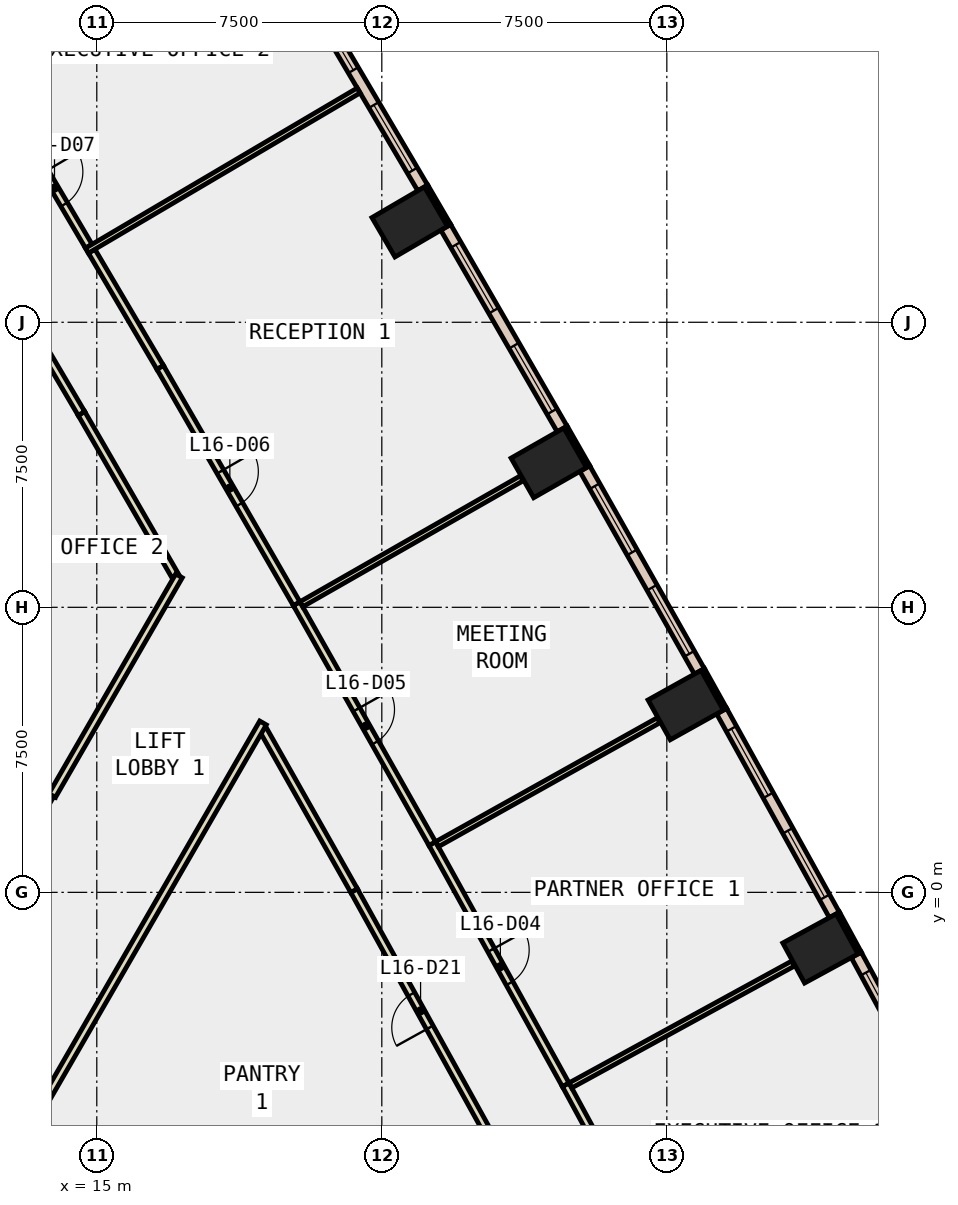
"""IFC4 building model, lengths in metres.
Left out: names, types, materials, properties, quantities, classifications, styles, units other than length and angle.
Written with IfcOpenShell. Run it as: python <this file> out.ifc"""

import sys

from ifc_helpers import new_model, si_unit, direction, frame, frame_2d, origin, origin_2d, place, context, subcontext, project, spatial, polyline, rectangle, outline, extrude, element, fill, save


model = new_model("IFC4")
c1 = context("Model", 3, precision=1e-05, world=origin(), true_north=direction((0.0, 1.0)))
c2 = subcontext(c1, "Body", "Model", "MODEL_VIEW")
j1 = project(units=[si_unit("LENGTHUNIT", "METRE"), si_unit("PLANEANGLEUNIT", "RADIAN")], contexts=[c1])
p1 = place(None, origin())
s1 = spatial("IfcSite", under=j1, at=p1, CompositionType="ELEMENT")
p2 = place(p1, origin())
s2 = spatial("IfcBuilding", under=s1, at=p2, CompositionType="ELEMENT")
p3 = place(p2, frame((0.0, 0.0, 77.0)))
s3 = spatial("IfcBuildingStorey", under=s2, at=p3, CompositionType="ELEMENT", Elevation=77.0)
for number, where, z_axis, x_axis in (
    (1, (34.041, -1.477, -0.4), (0.0, 0.0, 1.0), (-0.478, 0.878, 0.0)),
    (2, (30.497, 4.928, -0.4), (0.0, 0.0, 1.0), (-0.487, 0.873, 0.0)),
    (3, (26.894, 11.301, -0.4), (0.0, 0.0, 1.0), (-0.496, 0.869, 0.0)),
    (4, (23.234, 17.64, -0.4), (0.0, 0.0, 1.0), (-0.504, 0.864, 0.0)),
):
    element("IfcColumn", number, at=place(p3, frame(where, z_axis=z_axis, x_axis=x_axis)), inside=s3, PredefinedType="COLUMN", context=c2, shape_type="SweptSolid", body=[
        extrude(rectangle(XDim=1.2, YDim=1.6, at=origin_2d()), origin(), (0.0, 0.0, 1.0), 4.0),
    ])
p4 = place(p3, frame((0.0, 0.0, -0.4)))
e5 = element("IfcWall", 5, at=p4, inside=s3, PredefinedType="SHEAR", context=c2, shape_type="SweptSolid", body=[
    extrude(outline(polyline([(8.517, 11.748), (7.694, 11.273), (12.759, 2.5), (13.856, 2.5), (8.517, 11.748)])), origin(), (0.0, 0.0, 1.0), 4.0),
])
p5 = place(p3, frame((0.0, 0.0, -0.4)))
e6 = element("IfcWall", 6, at=p5, inside=s3, PredefinedType="SHEAR", context=c2, shape_type="SweptSolid", body=[
    extrude(outline(polyline([(11.844, 0.915), (12.667, 0.44), (13.856, 2.5), (12.759, 2.5), (11.844, 0.915)])), origin(), (0.0, 0.0, 1.0), 4.0),
])
p6 = place(p3, frame((9.31, -5.375, -0.4), z_axis=(0.0, 0.0, 1.0), x_axis=(0.866017533419, -0.500013631625, 0.0)))
e7 = element("IfcWall", 7, at=p6, inside=s3, PredefinedType="SHEAR", context=c2, shape_type="SweptSolid", body=[
    extrude(rectangle(XDim=9.0, YDim=0.8, at=frame_2d((4.5, 0.0))), origin(), (0.0, 0.0, 1.0), 4.0),
])
p7 = place(p3, frame((35.074, -1.598, 0.0), z_axis=(0.0, 0.0, 1.0), x_axis=(-0.478267644701, 0.878214131082, 0.0)))
e8 = element("IfcWall", 8, at=p7, inside=s3, PredefinedType="STANDARD", context=c2, shape_type="SweptSolid", body=[
    extrude(rectangle(XDim=1.2, YDim=0.1, at=frame_2d((0.6, 0.0))), origin(), (0.0, 0.0, 1.0), 3.6),
])
p8 = place(p3, frame((31.531, 4.818, 0.0), z_axis=(0.0, 0.0, 1.0), x_axis=(-0.486817526853, 0.873503689488, 0.0)))
e9 = element("IfcWall", 9, at=p8, inside=s3, PredefinedType="STANDARD", context=c2, shape_type="SweptSolid", body=[
    extrude(rectangle(XDim=1.2, YDim=0.1, at=frame_2d((0.6, 0.0))), origin(), (0.0, 0.0, 1.0), 3.6),
])
p9 = place(p3, frame((27.93, 11.201, 0.0), z_axis=(0.0, 0.0, 1.0), x_axis=(-0.495854054996, 0.868405870629, 0.0)))
e10 = element("IfcWall", 10, at=p9, inside=s3, PredefinedType="STANDARD", context=c2, shape_type="SweptSolid", body=[
    extrude(rectangle(XDim=1.2, YDim=0.1, at=frame_2d((0.6, 0.0))), origin(), (0.0, 0.0, 1.0), 3.6),
])
p10 = place(p3, frame((24.27, 17.551, 0.0), z_axis=(0.0, 0.0, 1.0), x_axis=(-0.504313844903, 0.863520437418, 0.0)))
e11 = element("IfcWall", 11, at=p10, inside=s3, PredefinedType="STANDARD", context=c2, shape_type="SweptSolid", body=[
    extrude(rectangle(XDim=1.2, YDim=0.1, at=frame_2d((0.6, 0.0))), origin(), (0.0, 0.0, 1.0), 3.6),
])
p11 = place(p3, frame((37.903, -7.036, 0.0), z_axis=(0.0, 0.0, 1.0), x_axis=(-0.476174096946, 0.879351027404, 0.0)))
e12 = element("IfcWall", 12, at=p11, inside=s3, PredefinedType="STANDARD", context=c2, shape_type="SweptSolid", body=[
    extrude(rectangle(XDim=6.131, YDim=0.3, at=frame_2d((3.065, 0.0))), origin(), (0.0, 0.0, 1.0), 3.6),
])
p12 = place(p11, frame((0.533, 0.0, 0.9)))
e13 = element("IfcOpeningElement", 13, at=p12, cuts=e12, PredefinedType="OPENING", context=c2, shape_type="SweptSolid", body=[
    extrude(rectangle(XDim=2.0, YDim=2.6, at=frame_2d((1.0, 1.3))), frame((0.0, 0.16, 0.0), z_axis=(0.0, -1.0, 0.0), x_axis=(1.0, 0.0, 0.0)), (0.0, 0.0, 1.0), 0.32),
])
p13 = place(p11, frame((3.598, 0.0, 0.9)))
e14 = element("IfcOpeningElement", 14, at=p13, cuts=e12, PredefinedType="OPENING", context=c2, shape_type="SweptSolid", body=[
    extrude(rectangle(XDim=2.0, YDim=2.6, at=frame_2d((1.0, 1.3))), frame((0.0, 0.16, 0.0), z_axis=(0.0, -1.0, 0.0), x_axis=(1.0, 0.0, 0.0)), (0.0, 0.0, 1.0), 0.32),
])
p14 = place(p3, frame((34.409, -0.595, 0.0), z_axis=(0.0, 0.0, 1.0), x_axis=(-0.484025698618, 0.875053782963, 0.0)))
e15 = element("IfcWall", 15, at=p14, inside=s3, PredefinedType="STANDARD", context=c2, shape_type="SweptSolid", body=[
    extrude(rectangle(XDim=6.13, YDim=0.3, at=frame_2d((3.065, 0.0))), origin(), (0.0, 0.0, 1.0), 3.6),
])
p15 = place(p14, frame((0.532, 0.0, 0.9)))
e16 = element("IfcOpeningElement", 16, at=p15, cuts=e15, PredefinedType="OPENING", context=c2, shape_type="SweptSolid", body=[
    extrude(rectangle(XDim=2.0, YDim=2.6, at=frame_2d((1.0, 1.3))), frame((0.0, 0.16, 0.0), z_axis=(0.0, -1.0, 0.0), x_axis=(1.0, 0.0, 0.0)), (0.0, 0.0, 1.0), 0.32),
])
p16 = place(p14, frame((3.597, 0.0, 0.9)))
e17 = element("IfcOpeningElement", 17, at=p16, cuts=e15, PredefinedType="OPENING", context=c2, shape_type="SweptSolid", body=[
    extrude(rectangle(XDim=2.0, YDim=2.6, at=frame_2d((1.0, 1.3))), frame((0.0, 0.16, 0.0), z_axis=(0.0, -1.0, 0.0), x_axis=(1.0, 0.0, 0.0)), (0.0, 0.0, 1.0), 0.32),
])
p17 = place(p3, frame((30.857, 5.814, 0.0), z_axis=(0.0, 0.0, 1.0), x_axis=(-0.492097935349, 0.870539845168, 0.0)))
e18 = element("IfcWall", 18, at=p17, inside=s3, PredefinedType="STANDARD", context=c2, shape_type="SweptSolid", body=[
    extrude(rectangle(XDim=6.131, YDim=0.3, at=frame_2d((3.065, 0.0))), origin(), (0.0, 0.0, 1.0), 3.6),
])
p18 = place(p17, frame((0.533, 0.0, 0.9)))
e19 = element("IfcOpeningElement", 19, at=p18, cuts=e18, PredefinedType="OPENING", context=c2, shape_type="SweptSolid", body=[
    extrude(rectangle(XDim=2.0, YDim=2.6, at=frame_2d((1.0, 1.3))), frame((0.0, 0.16, 0.0), z_axis=(0.0, -1.0, 0.0), x_axis=(1.0, 0.0, 0.0)), (0.0, 0.0, 1.0), 0.32),
])
p19 = place(p17, frame((3.598, 0.0, 0.9)))
e20 = element("IfcOpeningElement", 20, at=p19, cuts=e18, PredefinedType="OPENING", context=c2, shape_type="SweptSolid", body=[
    extrude(rectangle(XDim=2.0, YDim=2.6, at=frame_2d((1.0, 1.3))), frame((0.0, 0.16, 0.0), z_axis=(0.0, -1.0, 0.0), x_axis=(1.0, 0.0, 0.0)), (0.0, 0.0, 1.0), 0.32),
])
p20 = place(p3, frame((27.246, 12.191, 0.0), z_axis=(0.0, 0.0, 1.0), x_axis=(-0.499998239139, 0.866026420416, 0.0)))
e21 = element("IfcWall", 21, at=p20, inside=s3, PredefinedType="STANDARD", context=c2, shape_type="SweptSolid", body=[
    extrude(rectangle(XDim=6.13, YDim=0.3, at=frame_2d((3.065, 0.0))), origin(), (0.0, 0.0, 1.0), 3.6),
])
p21 = place(p20, frame((0.533, 0.0, 0.9)))
e22 = element("IfcOpeningElement", 22, at=p21, cuts=e21, PredefinedType="OPENING", context=c2, shape_type="SweptSolid", body=[
    extrude(rectangle(XDim=2.0, YDim=2.6, at=frame_2d((1.0, 1.3))), frame((0.0, 0.16, 0.0), z_axis=(0.0, -1.0, 0.0), x_axis=(1.0, 0.0, 0.0)), (0.0, 0.0, 1.0), 0.32),
])
p22 = place(p20, frame((3.598, 0.0, 0.9)))
e23 = element("IfcOpeningElement", 23, at=p22, cuts=e21, PredefinedType="OPENING", context=c2, shape_type="SweptSolid", body=[
    extrude(rectangle(XDim=2.0, YDim=2.6, at=frame_2d((1.0, 1.3))), frame((0.0, 0.16, 0.0), z_axis=(0.0, -1.0, 0.0), x_axis=(1.0, 0.0, 0.0)), (0.0, 0.0, 1.0), 0.32),
])
p23 = place(p3, frame((23.577, 18.534, 0.0), z_axis=(0.0, 0.0, 1.0), x_axis=(-0.507716058644, 0.861524465001, 0.0)))
e24 = element("IfcWall", 24, at=p23, inside=s3, PredefinedType="STANDARD", context=c2, shape_type="SweptSolid", body=[
    extrude(rectangle(XDim=6.131, YDim=0.3, at=frame_2d((3.065, 0.0))), origin(), (0.0, 0.0, 1.0), 3.6),
])
p24 = place(p23, frame((0.533, 0.0, 0.9)))
e25 = element("IfcOpeningElement", 25, at=p24, cuts=e24, PredefinedType="OPENING", context=c2, shape_type="SweptSolid", body=[
    extrude(rectangle(XDim=2.0, YDim=2.6, at=frame_2d((1.0, 1.3))), frame((0.0, 0.16, 0.0), z_axis=(0.0, -1.0, 0.0), x_axis=(1.0, 0.0, 0.0)), (0.0, 0.0, 1.0), 0.32),
])
p25 = place(p23, frame((3.598, 0.0, 0.9)))
e26 = element("IfcOpeningElement", 26, at=p25, cuts=e24, PredefinedType="OPENING", context=c2, shape_type="SweptSolid", body=[
    extrude(rectangle(XDim=2.0, YDim=2.6, at=frame_2d((1.0, 1.3))), frame((0.0, 0.16, 0.0), z_axis=(0.0, -1.0, 0.0), x_axis=(1.0, 0.0, 0.0)), (0.0, 0.0, 1.0), 0.32),
])
p26 = place(p3, frame((17.063, 8.328, 0.0), z_axis=(0.0, 0.0, 1.0), x_axis=(-0.499986575203, 0.866033154456, 0.0)))
e27 = element("IfcWall", 27, at=p26, inside=s3, PredefinedType="PARTITIONING", context=c2, shape_type="SweptSolid", body=[
    extrude(rectangle(XDim=4.934, YDim=0.2, at=frame_2d((2.467, 0.0))), origin(), (0.0, 0.0, 1.0), 3.6),
])
p27 = place(p3, frame((14.596, 12.601, 0.0), z_axis=(0.0, 0.0, 1.0), x_axis=(-0.507547610008, 0.861623713447, 0.0)))
e28 = element("IfcWall", 28, at=p27, inside=s3, PredefinedType="PARTITIONING", context=c2, shape_type="SweptSolid", body=[
    extrude(rectangle(XDim=1.901, YDim=0.2, at=frame_2d((0.95, 0.0))), origin(), (0.0, 0.0, 1.0), 3.6),
])
p28 = place(p3, frame((25.27, -6.281, 0.0), z_axis=(0.0, 0.0, 1.0), x_axis=(-0.484062485326, 0.875033433818, 0.0)))
e29 = element("IfcWall", 29, at=p28, inside=s3, PredefinedType="PARTITIONING", context=c2, shape_type="SweptSolid", body=[
    extrude(rectangle(XDim=7.23, YDim=0.2, at=frame_2d((3.615, 0.0))), origin(), (0.0, 0.0, 1.0), 3.6),
])
p29 = place(p28, frame((3.115, 0.0, 0.0)))
e30 = element("IfcOpeningElement", 30, at=p29, cuts=e29, PredefinedType="OPENING", context=c2, shape_type="SweptSolid", body=[
    extrude(rectangle(XDim=1.0, YDim=2.1, at=frame_2d((0.5, 1.05))), frame((0.0, 0.11, 0.0), z_axis=(0.0, -1.0, 0.0), x_axis=(1.0, 0.0, 0.0)), (0.0, 0.0, 1.0), 0.22),
])
p30 = place(p3, frame((21.77, 0.046, 0.0), z_axis=(0.0, 0.0, 1.0), x_axis=(-0.492148137455, 0.870511465059, 0.0)))
e31 = element("IfcWall", 31, at=p30, inside=s3, PredefinedType="PARTITIONING", context=c2, shape_type="SweptSolid", body=[
    extrude(rectangle(XDim=4.868, YDim=0.2, at=frame_2d((2.434, 0.0))), origin(), (0.0, 0.0, 1.0), 3.6),
])
p31 = place(p3, frame((27.339, -5.062, 0.0), z_axis=(0.0, 0.0, 1.0), x_axis=(0.476248444599, -0.879310763619, 0.0)))
e32 = element("IfcWall", 32, at=p31, inside=s3, PredefinedType="PARTITIONING", context=c2, shape_type="SweptSolid", body=[
    extrude(rectangle(XDim=7.252, YDim=0.2, at=frame_2d((3.626, 0.0))), origin(), (0.0, 0.0, 1.0), 3.6),
])
p32 = place(p31, frame((3.201, 0.0, 0.0)))
e33 = element("IfcOpeningElement", 33, at=p32, cuts=e32, PredefinedType="OPENING", context=c2, shape_type="SweptSolid", body=[
    extrude(rectangle(XDim=1.0, YDim=2.1, at=frame_2d((0.5, 1.05))), frame((0.0, 0.11, 0.0), z_axis=(0.0, -1.0, 0.0), x_axis=(1.0, 0.0, 0.0)), (0.0, 0.0, 1.0), 0.22),
])
p33 = place(p3, frame((23.828, 1.283, 0.0), z_axis=(0.0, 0.0, 1.0), x_axis=(0.484064127728, -0.875032525251, 0.0)))
e34 = element("IfcWall", 34, at=p33, inside=s3, PredefinedType="PARTITIONING", context=c2, shape_type="SweptSolid", body=[
    extrude(rectangle(XDim=7.251, YDim=0.2, at=frame_2d((3.625, 0.0))), origin(), (0.0, 0.0, 1.0), 3.6),
])
p34 = place(p33, frame((3.201, 0.0, 0.0)))
e35 = element("IfcOpeningElement", 35, at=p34, cuts=e34, PredefinedType="OPENING", context=c2, shape_type="SweptSolid", body=[
    extrude(rectangle(XDim=1.0, YDim=2.1, at=frame_2d((0.5, 1.05))), frame((0.0, 0.11, 0.0), z_axis=(0.0, -1.0, 0.0), x_axis=(1.0, 0.0, 0.0)), (0.0, 0.0, 1.0), 0.22),
])
p35 = place(p3, frame((20.259, 7.596, 0.0), z_axis=(0.0, 0.0, 1.0), x_axis=(0.492021755503, -0.870582903641, 0.0)))
e36 = element("IfcWall", 36, at=p35, inside=s3, PredefinedType="PARTITIONING", context=c2, shape_type="SweptSolid", body=[
    extrude(rectangle(XDim=7.251, YDim=0.2, at=frame_2d((3.626, 0.0))), origin(), (0.0, 0.0, 1.0), 3.6),
])
p36 = place(p35, frame((3.201, 0.0, 0.0)))
e37 = element("IfcOpeningElement", 37, at=p36, cuts=e36, PredefinedType="OPENING", context=c2, shape_type="SweptSolid", body=[
    extrude(rectangle(XDim=1.0, YDim=2.1, at=frame_2d((0.5, 1.05))), frame((0.0, 0.11, 0.0), z_axis=(0.0, -1.0, 0.0), x_axis=(1.0, 0.0, 0.0)), (0.0, 0.0, 1.0), 0.22),
])
p37 = place(p3, frame((14.865, 16.871, 0.0), z_axis=(0.0, 0.0, 1.0), x_axis=(0.507839876831, -0.861451484125, 0.0)))
e38 = element("IfcWall", 38, at=p37, inside=s3, PredefinedType="PARTITIONING", context=c2, shape_type="SweptSolid", body=[
    extrude(rectangle(XDim=3.552, YDim=0.2, at=frame_2d((1.776, 0.0))), origin(), (0.0, 0.0, 1.0), 3.6),
])
p38 = place(p3, frame((16.669, 13.811, 0.0), z_axis=(0.0, 0.0, 1.0), x_axis=(0.500027672765, -0.866009426316, 0.0)))
e39 = element("IfcWall", 39, at=p38, inside=s3, PredefinedType="PARTITIONING", context=c2, shape_type="SweptSolid", body=[
    extrude(rectangle(XDim=7.178, YDim=0.2, at=frame_2d((3.589, 0.0))), origin(), (0.0, 0.0, 1.0), 3.6),
])
p39 = place(p38, frame((3.164, 0.0, 0.0)))
e40 = element("IfcOpeningElement", 40, at=p39, cuts=e39, PredefinedType="OPENING", context=c2, shape_type="SweptSolid", body=[
    extrude(rectangle(XDim=1.0, YDim=2.1, at=frame_2d((0.5, 1.05))), frame((0.0, 0.11, 0.0), z_axis=(0.0, -1.0, 0.0), x_axis=(1.0, 0.0, 0.0)), (0.0, 0.0, 1.0), 0.22),
])
p40 = place(p3, frame((12.986, 20.059, 0.0), z_axis=(0.0, 0.0, 1.0), x_axis=(0.507876424268, -0.861429937762, 0.0)))
e41 = element("IfcWall", 41, at=p40, inside=s3, PredefinedType="PARTITIONING", context=c2, shape_type="SweptSolid", body=[
    extrude(rectangle(XDim=3.55, YDim=0.2, at=frame_2d((1.775, 0.0))), origin(), (0.0, 0.0, 1.0), 3.6),
])
p41 = place(p40, frame((1.275, 0.0, 0.0)))
e42 = element("IfcOpeningElement", 42, at=p41, cuts=e41, PredefinedType="OPENING", context=c2, shape_type="SweptSolid", body=[
    extrude(rectangle(XDim=1.0, YDim=2.1, at=frame_2d((0.5, 1.05))), frame((0.0, 0.11, 0.0), z_axis=(0.0, -1.0, 0.0), x_axis=(1.0, 0.0, 0.0)), (0.0, 0.0, 1.0), 0.22),
])
p42 = place(p3, frame((13.827, 2.55, 0.0), z_axis=(0.0, 0.0, 1.0), x_axis=(0.500039204794, 0.866002767703, 0.0)))
e43 = element("IfcWall", 43, at=p42, inside=s3, PredefinedType="PARTITIONING", context=c2, shape_type="SweptSolid", body=[
    extrude(rectangle(XDim=6.672, YDim=0.2, at=frame_2d((3.336, 0.0))), origin(), (0.0, 0.0, 1.0), 3.6),
])
p43 = place(p3, frame((19.374, 4.458, 0.0), z_axis=(0.0, 0.0, 1.0), x_axis=(-0.499973880856, -0.866040483154, 0.0)))
e44 = element("IfcWall", 44, at=p43, inside=s3, PredefinedType="PARTITIONING", context=c2, shape_type="SweptSolid", body=[
    extrude(rectangle(XDim=13.113, YDim=0.2, at=frame_2d((6.556, 0.0))), origin(), (0.0, 0.0, 1.0), 3.6),
])
p44 = place(p3, frame((27.463, -5.08, 0.0), z_axis=(0.0, 0.0, 1.0), x_axis=(0.877227104806, 0.480075625911, 0.0)))
e45 = element("IfcWall", 45, at=p44, inside=s3, PredefinedType="PARTITIONING", context=c2, shape_type="SweptSolid", body=[
    extrude(rectangle(XDim=6.68, YDim=0.15, at=frame_2d((3.34, 0.0))), origin(), (0.0, 0.0, 1.0), 3.6),
])
p45 = place(p3, frame((23.951, 1.266, 0.0), z_axis=(0.0, 0.0, 1.0), x_axis=(0.872786908026, 0.488101437385, 0.0)))
e46 = element("IfcWall", 46, at=p45, inside=s3, PredefinedType="PARTITIONING", context=c2, shape_type="SweptSolid", body=[
    extrude(rectangle(XDim=6.681, YDim=0.15, at=frame_2d((3.34, 0.0))), origin(), (0.0, 0.0, 1.0), 3.6),
])
p46 = place(p3, frame((20.382, 7.58, 0.0), z_axis=(0.0, 0.0, 1.0), x_axis=(0.868256636797, 0.496115321935, 0.0)))
e47 = element("IfcWall", 47, at=p46, inside=s3, PredefinedType="PARTITIONING", context=c2, shape_type="SweptSolid", body=[
    extrude(rectangle(XDim=6.68, YDim=0.15, at=frame_2d((3.34, 0.0))), origin(), (0.0, 0.0, 1.0), 3.6),
])
p47 = place(p3, frame((14.741, 16.885, 0.0), z_axis=(0.0, 0.0, 1.0), x_axis=(0.861505144806, 0.507748840936, 0.0)))
e48 = element("IfcWall", 48, at=p47, inside=s3, PredefinedType="PARTITIONING", context=c2, shape_type="SweptSolid", body=[
    extrude(rectangle(XDim=8.3, YDim=0.15, at=frame_2d((4.15, 0.0))), origin(), (0.0, 0.0, 1.0), 3.6),
])
p48 = place(p13, origin())
e49 = element("IfcWindow", 49, at=p48, inside=s3, PartitioningType="SINGLE_PANEL", PredefinedType="WINDOW", context=c2, shape_type="SweptSolid", body=[
    extrude(rectangle(XDim=2.0, YDim=2.6, at=frame_2d((1.0, 1.3))), frame((0.0, 0.03, 0.0), z_axis=(0.0, -1.0, 0.0), x_axis=(1.0, 0.0, 0.0)), (0.0, 0.0, 1.0), 0.06),
])
fill(e14, e49)
p49 = place(p15, origin())
e50 = element("IfcWindow", 50, at=p49, inside=s3, PartitioningType="SINGLE_PANEL", PredefinedType="WINDOW", context=c2, shape_type="SweptSolid", body=[
    extrude(rectangle(XDim=2.0, YDim=2.6, at=frame_2d((1.0, 1.3))), frame((0.0, 0.03, 0.0), z_axis=(0.0, -1.0, 0.0), x_axis=(1.0, 0.0, 0.0)), (0.0, 0.0, 1.0), 0.06),
])
fill(e16, e50)
p50 = place(p16, origin())
e51 = element("IfcWindow", 51, at=p50, inside=s3, PartitioningType="SINGLE_PANEL", PredefinedType="WINDOW", context=c2, shape_type="SweptSolid", body=[
    extrude(rectangle(XDim=2.0, YDim=2.6, at=frame_2d((1.0, 1.3))), frame((0.0, 0.03, 0.0), z_axis=(0.0, -1.0, 0.0), x_axis=(1.0, 0.0, 0.0)), (0.0, 0.0, 1.0), 0.06),
])
fill(e17, e51)
p51 = place(p18, origin())
e52 = element("IfcWindow", 52, at=p51, inside=s3, PartitioningType="SINGLE_PANEL", PredefinedType="WINDOW", context=c2, shape_type="SweptSolid", body=[
    extrude(rectangle(XDim=2.0, YDim=2.6, at=frame_2d((1.0, 1.3))), frame((0.0, 0.03, 0.0), z_axis=(0.0, -1.0, 0.0), x_axis=(1.0, 0.0, 0.0)), (0.0, 0.0, 1.0), 0.06),
])
fill(e19, e52)
p52 = place(p19, origin())
e53 = element("IfcWindow", 53, at=p52, inside=s3, PartitioningType="SINGLE_PANEL", PredefinedType="WINDOW", context=c2, shape_type="SweptSolid", body=[
    extrude(rectangle(XDim=2.0, YDim=2.6, at=frame_2d((1.0, 1.3))), frame((0.0, 0.03, 0.0), z_axis=(0.0, -1.0, 0.0), x_axis=(1.0, 0.0, 0.0)), (0.0, 0.0, 1.0), 0.06),
])
fill(e20, e53)
p53 = place(p21, origin())
e54 = element("IfcWindow", 54, at=p53, inside=s3, PartitioningType="SINGLE_PANEL", PredefinedType="WINDOW", context=c2, shape_type="SweptSolid", body=[
    extrude(rectangle(XDim=2.0, YDim=2.6, at=frame_2d((1.0, 1.3))), frame((0.0, 0.03, 0.0), z_axis=(0.0, -1.0, 0.0), x_axis=(1.0, 0.0, 0.0)), (0.0, 0.0, 1.0), 0.06),
])
fill(e22, e54)
p54 = place(p22, origin())
e55 = element("IfcWindow", 55, at=p54, inside=s3, PartitioningType="SINGLE_PANEL", PredefinedType="WINDOW", context=c2, shape_type="SweptSolid", body=[
    extrude(rectangle(XDim=2.0, YDim=2.6, at=frame_2d((1.0, 1.3))), frame((0.0, 0.03, 0.0), z_axis=(0.0, -1.0, 0.0), x_axis=(1.0, 0.0, 0.0)), (0.0, 0.0, 1.0), 0.06),
])
fill(e23, e55)
p55 = place(p24, origin())
e56 = element("IfcWindow", 56, at=p55, inside=s3, PartitioningType="SINGLE_PANEL", PredefinedType="WINDOW", context=c2, shape_type="SweptSolid", body=[
    extrude(rectangle(XDim=2.0, YDim=2.6, at=frame_2d((1.0, 1.3))), frame((0.0, 0.03, 0.0), z_axis=(0.0, -1.0, 0.0), x_axis=(1.0, 0.0, 0.0)), (0.0, 0.0, 1.0), 0.06),
])
fill(e25, e56)
p56 = place(p25, origin())
e57 = element("IfcWindow", 57, at=p56, inside=s3, PartitioningType="SINGLE_PANEL", PredefinedType="WINDOW", context=c2, shape_type="SweptSolid", body=[
    extrude(rectangle(XDim=2.0, YDim=2.6, at=frame_2d((1.0, 1.3))), frame((0.0, 0.03, 0.0), z_axis=(0.0, -1.0, 0.0), x_axis=(1.0, 0.0, 0.0)), (0.0, 0.0, 1.0), 0.06),
])
fill(e26, e57)
p57 = place(p34, origin())
e58 = element("IfcDoor", 58, at=p57, inside=s3, OperationType="SINGLE_SWING_LEFT", PredefinedType="DOOR", context=c2, shape_type="SweptSolid", body=[
    extrude(rectangle(XDim=1.0, YDim=2.1, at=frame_2d((0.5, 1.05))), frame((0.0, 0.025, 0.0), z_axis=(0.0, -1.0, 0.0), x_axis=(1.0, 0.0, 0.0)), (0.0, 0.0, 1.0), 0.05),
])
fill(e35, e58)
p58 = place(p36, origin())
e59 = element("IfcDoor", 59, at=p58, inside=s3, OperationType="SINGLE_SWING_LEFT", PredefinedType="DOOR", context=c2, shape_type="SweptSolid", body=[
    extrude(rectangle(XDim=1.0, YDim=2.1, at=frame_2d((0.5, 1.05))), frame((0.0, 0.025, 0.0), z_axis=(0.0, -1.0, 0.0), x_axis=(1.0, 0.0, 0.0)), (0.0, 0.0, 1.0), 0.05),
])
fill(e37, e59)
p59 = place(p39, origin())
e60 = element("IfcDoor", 60, at=p59, inside=s3, OperationType="SINGLE_SWING_LEFT", PredefinedType="DOOR", context=c2, shape_type="SweptSolid", body=[
    extrude(rectangle(XDim=1.0, YDim=2.1, at=frame_2d((0.5, 1.05))), frame((0.0, 0.025, 0.0), z_axis=(0.0, -1.0, 0.0), x_axis=(1.0, 0.0, 0.0)), (0.0, 0.0, 1.0), 0.05),
])
fill(e40, e60)
p60 = place(p41, origin())
e61 = element("IfcDoor", 61, at=p60, inside=s3, OperationType="SINGLE_SWING_RIGHT", PredefinedType="DOOR", context=c2, shape_type="SweptSolid", body=[
    extrude(rectangle(XDim=1.0, YDim=2.1, at=frame_2d((0.5, 1.05))), frame((0.0, 0.025, 0.0), z_axis=(0.0, -1.0, 0.0), x_axis=(1.0, 0.0, 0.0)), (0.0, 0.0, 1.0), 0.05),
])
fill(e42, e61)
p61 = place(p29, origin())
e62 = element("IfcDoor", 62, at=p61, inside=s3, OperationType="SINGLE_SWING_RIGHT", PredefinedType="DOOR", context=c2, shape_type="SweptSolid", body=[
    extrude(rectangle(XDim=1.0, YDim=2.1, at=frame_2d((0.5, 1.05))), frame((0.0, 0.025, 0.0), z_axis=(0.0, -1.0, 0.0), x_axis=(1.0, 0.0, 0.0)), (0.0, 0.0, 1.0), 0.05),
])
fill(e30, e62)
save(model, sys.argv[1])
